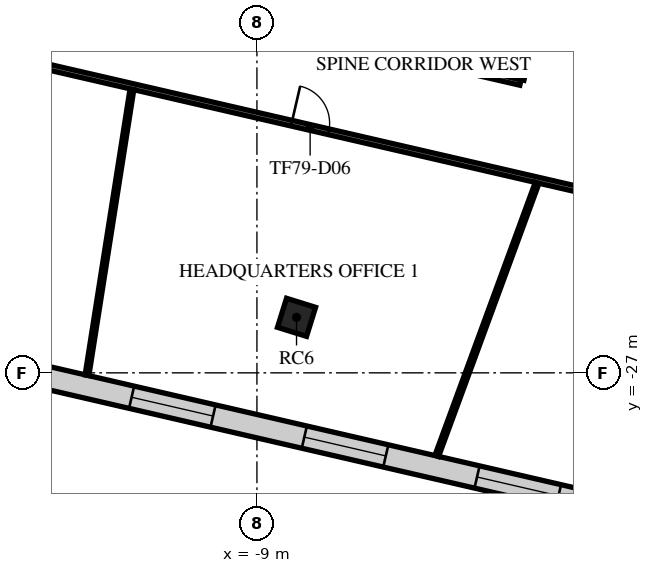
"""IFC4 building model, lengths in metres.
Left out: names, types, materials, properties, quantities, classifications, styles, units other than length and angle.
Written with IfcOpenShell. Run it as: python <this file> out.ifc"""

import sys

from ifc_helpers import new_model, si_unit, direction, frame, frame_2d, origin, origin_2d, place, context, subcontext, project, spatial, rectangle, extrude, element, fill, save


model = new_model("IFC4")
c1 = context("Model", 3, precision=1e-05, world=origin(), true_north=direction((0.0, 1.0)))
c2 = subcontext(c1, "Body", "Model", "MODEL_VIEW")
j1 = project(units=[si_unit("LENGTHUNIT", "METRE"), si_unit("PLANEANGLEUNIT", "RADIAN")], contexts=[c1])
p1 = place(None, origin())
s1 = spatial("IfcSite", under=j1, at=p1, CompositionType="ELEMENT")
p2 = place(p1, origin())
s2 = spatial("IfcBuilding", under=s1, at=p2, CompositionType="ELEMENT")
p3 = place(p2, frame((0.0, 0.0, 332.5)))
s3 = spatial("IfcBuildingStorey", under=s2, at=p3, CompositionType="ELEMENT", Elevation=332.5)
p4 = place(p3, frame((-7.958, -25.539, 0.0), z_axis=(0.0, 0.0, 1.0), x_axis=(0.297503182032, 0.954720826567, 0.0)))
e1 = element("IfcColumn", 1, at=p4, inside=s3, PredefinedType="COLUMN", context=c2, shape_type="SweptSolid", body=[
    extrude(rectangle(XDim=0.8, YDim=0.8, at=origin_2d()), origin(), (0.0, 0.0, 1.0), 4.0),
])
p5 = place(p3, frame((-27.133, -24.217, 0.0), z_axis=(0.0, 0.0, 1.0), x_axis=(0.974370901945, -0.224947428174, 0.0)))
e2 = element("IfcWall", 2, at=p5, inside=s3, PredefinedType="STANDARD", context=c2, shape_type="SweptSolid", body=[
    extrude(rectangle(XDim=41.979, YDim=0.6, at=frame_2d((20.99, 0.0))), origin(), (0.0, 0.0, 1.0), 3.65),
])
p6 = place(p5, frame((1.232, 0.0, 0.9)))
e3 = element("IfcOpeningElement", 3, at=p6, cuts=e2, PredefinedType="OPENING", context=c2, shape_type="SweptSolid", body=[
    extrude(rectangle(XDim=2.2, YDim=2.1, at=frame_2d((1.1, 1.05))), frame((0.0, 0.31, 0.0), z_axis=(0.0, -1.0, 0.0), x_axis=(1.0, 0.0, 0.0)), (0.0, 0.0, 1.0), 0.62),
])
p7 = place(p5, frame((5.896, 0.0, 0.9)))
e4 = element("IfcOpeningElement", 4, at=p7, cuts=e2, PredefinedType="OPENING", context=c2, shape_type="SweptSolid", body=[
    extrude(rectangle(XDim=2.2, YDim=2.1, at=frame_2d((1.1, 1.05))), frame((0.0, 0.31, 0.0), z_axis=(0.0, -1.0, 0.0), x_axis=(1.0, 0.0, 0.0)), (0.0, 0.0, 1.0), 0.62),
])
p8 = place(p5, frame((10.561, 0.0, 0.9)))
e5 = element("IfcOpeningElement", 5, at=p8, cuts=e2, PredefinedType="OPENING", context=c2, shape_type="SweptSolid", body=[
    extrude(rectangle(XDim=2.2, YDim=2.1, at=frame_2d((1.1, 1.05))), frame((0.0, 0.31, 0.0), z_axis=(0.0, -1.0, 0.0), x_axis=(1.0, 0.0, 0.0)), (0.0, 0.0, 1.0), 0.62),
])
p9 = place(p5, frame((15.225, 0.0, 0.9)))
e6 = element("IfcOpeningElement", 6, at=p9, cuts=e2, PredefinedType="OPENING", context=c2, shape_type="SweptSolid", body=[
    extrude(rectangle(XDim=2.2, YDim=2.1, at=frame_2d((1.1, 1.05))), frame((0.0, 0.31, 0.0), z_axis=(0.0, -1.0, 0.0), x_axis=(1.0, 0.0, 0.0)), (0.0, 0.0, 1.0), 0.62),
])
p10 = place(p5, frame((19.89, 0.0, 0.9)))
e7 = element("IfcOpeningElement", 7, at=p10, cuts=e2, PredefinedType="OPENING", context=c2, shape_type="SweptSolid", body=[
    extrude(rectangle(XDim=2.2, YDim=2.1, at=frame_2d((1.1, 1.05))), frame((0.0, 0.31, 0.0), z_axis=(0.0, -1.0, 0.0), x_axis=(1.0, 0.0, 0.0)), (0.0, 0.0, 1.0), 0.62),
])
p11 = place(p5, frame((24.554, 0.0, 0.9)))
e8 = element("IfcOpeningElement", 8, at=p11, cuts=e2, PredefinedType="OPENING", context=c2, shape_type="SweptSolid", body=[
    extrude(rectangle(XDim=2.2, YDim=2.1, at=frame_2d((1.1, 1.05))), frame((0.0, 0.31, 0.0), z_axis=(0.0, -1.0, 0.0), x_axis=(1.0, 0.0, 0.0)), (0.0, 0.0, 1.0), 0.62),
])
p12 = place(p5, frame((29.218, 0.0, 0.9)))
e9 = element("IfcOpeningElement", 9, at=p12, cuts=e2, PredefinedType="OPENING", context=c2, shape_type="SweptSolid", body=[
    extrude(rectangle(XDim=2.2, YDim=2.1, at=frame_2d((1.1, 1.05))), frame((0.0, 0.31, 0.0), z_axis=(0.0, -1.0, 0.0), x_axis=(1.0, 0.0, 0.0)), (0.0, 0.0, 1.0), 0.62),
])
p13 = place(p5, frame((33.883, 0.0, 0.9)))
e10 = element("IfcOpeningElement", 10, at=p13, cuts=e2, PredefinedType="OPENING", context=c2, shape_type="SweptSolid", body=[
    extrude(rectangle(XDim=2.2, YDim=2.1, at=frame_2d((1.1, 1.05))), frame((0.0, 0.31, 0.0), z_axis=(0.0, -1.0, 0.0), x_axis=(1.0, 0.0, 0.0)), (0.0, 0.0, 1.0), 0.62),
])
p14 = place(p5, frame((38.547, 0.0, 0.9)))
e11 = element("IfcOpeningElement", 11, at=p14, cuts=e2, PredefinedType="OPENING", context=c2, shape_type="SweptSolid", body=[
    extrude(rectangle(XDim=2.2, YDim=2.1, at=frame_2d((1.1, 1.05))), frame((0.0, 0.31, 0.0), z_axis=(0.0, -1.0, 0.0), x_axis=(1.0, 0.0, 0.0)), (0.0, 0.0, 1.0), 0.62),
])
p15 = place(p3, frame((-22.037, -17.21, 0.0), z_axis=(0.0, 0.0, 1.0), x_axis=(0.974365877869, -0.224969189101, 0.0)))
e12 = element("IfcWall", 12, at=p15, inside=s3, PredefinedType="PARTITIONING", context=c2, shape_type="SweptSolid", body=[
    extrude(rectangle(XDim=35.276, YDim=0.15, at=frame_2d((17.638, 0.0))), origin(), (0.0, 0.0, 1.0), 3.25),
])
p16 = place(p15, frame((14.317, 0.0, 0.0)))
e13 = element("IfcOpeningElement", 13, at=p16, cuts=e12, PredefinedType="OPENING", context=c2, shape_type="SweptSolid", body=[
    extrude(rectangle(XDim=1.0, YDim=2.1, at=frame_2d((0.5, 1.05))), frame((0.0, 0.085, 0.0), z_axis=(0.0, -1.0, 0.0), x_axis=(1.0, 0.0, 0.0)), (0.0, 0.0, 1.0), 0.17),
])
p17 = place(p3, frame((-21.497, -14.872, 0.0), z_axis=(0.0, 0.0, 1.0), x_axis=(0.974371384758, -0.224945336838, 0.0)))
e14 = element("IfcWall", 14, at=p17, inside=s3, PredefinedType="PARTITIONING", context=c2, shape_type="SweptSolid", body=[
    extrude(rectangle(XDim=19.943, YDim=0.15, at=frame_2d((9.972, 0.0))), origin(), (0.0, 0.0, 1.0), 3.25),
])
p18 = place(p17, frame((3.8, 0.0, 0.0)))
e15 = element("IfcOpeningElement", 15, at=p18, cuts=e14, PredefinedType="OPENING", context=c2, shape_type="SweptSolid", body=[
    extrude(rectangle(XDim=1.0, YDim=2.1, at=frame_2d((0.5, 1.05))), frame((0.0, 0.085, 0.0), z_axis=(0.0, -1.0, 0.0), x_axis=(1.0, 0.0, 0.0)), (0.0, 0.0, 1.0), 0.17),
])
p19 = place(p3, frame((-2.048, -19.285, 0.0), z_axis=(0.0, 0.0, 1.0), x_axis=(0.225024396784, 0.974353129441, 0.0)))
e16 = element("IfcWall", 16, at=p19, inside=s3, PredefinedType="PARTITIONING", context=c2, shape_type="SweptSolid", body=[
    extrude(rectangle(XDim=3.893, YDim=0.15, at=frame_2d((1.946, 0.0))), origin(), (0.0, 0.0, 1.0), 3.25),
])
p20 = place(p3, frame((-13.471, -27.061, 0.0), z_axis=(0.0, 0.0, 1.0), x_axis=(0.155249458532, 0.987875298621, 0.0)))
e17 = element("IfcWall", 17, at=p20, inside=s3, PredefinedType="PARTITIONING", context=c2, shape_type="SweptSolid", body=[
    extrude(rectangle(XDim=7.613, YDim=0.1, at=frame_2d((3.806, 0.0))), origin(), (0.0, 0.0, 1.0), 3.05),
])
p21 = place(p3, frame((-4.268, -29.186, 0.0), z_axis=(0.0, 0.0, 1.0), x_axis=(0.345023473148, 0.938594056543, 0.0)))
e18 = element("IfcWall", 18, at=p21, inside=s3, PredefinedType="PARTITIONING", context=c2, shape_type="SweptSolid", body=[
    extrude(rectangle(XDim=7.65, YDim=0.1, at=frame_2d((3.825, 0.0))), origin(), (0.0, 0.0, 1.0), 3.05),
])
p22 = place(p3, frame((-2.303, -19.226, 0.0), z_axis=(0.0, 0.0, 1.0), x_axis=(0.224864152428, 0.974390123592, 0.0)))
e19 = element("IfcWall", 19, at=p22, inside=s3, PredefinedType="PARTITIONING", context=c2, shape_type="SweptSolid", body=[
    extrude(rectangle(XDim=3.838, YDim=0.1, at=frame_2d((1.919, 0.0))), origin(), (0.0, 0.0, 1.0), 3.25),
])
p23 = place(p9, origin())
e20 = element("IfcWindow", 20, at=p23, inside=s3, PartitioningType="SINGLE_PANEL", PredefinedType="WINDOW", context=c2, shape_type="SweptSolid", body=[
    extrude(rectangle(XDim=2.2, YDim=2.1, at=frame_2d((1.1, 1.05))), frame((0.0, 0.03, 0.0), z_axis=(0.0, -1.0, 0.0), x_axis=(1.0, 0.0, 0.0)), (0.0, 0.0, 1.0), 0.06),
])
fill(e6, e20)
p24 = place(p10, origin())
e21 = element("IfcWindow", 21, at=p24, inside=s3, PartitioningType="SINGLE_PANEL", PredefinedType="WINDOW", context=c2, shape_type="SweptSolid", body=[
    extrude(rectangle(XDim=2.2, YDim=2.1, at=frame_2d((1.1, 1.05))), frame((0.0, 0.03, 0.0), z_axis=(0.0, -1.0, 0.0), x_axis=(1.0, 0.0, 0.0)), (0.0, 0.0, 1.0), 0.06),
])
fill(e7, e21)
p25 = place(p11, origin())
e22 = element("IfcWindow", 22, at=p25, inside=s3, PartitioningType="SINGLE_PANEL", PredefinedType="WINDOW", context=c2, shape_type="SweptSolid", body=[
    extrude(rectangle(XDim=2.2, YDim=2.1, at=frame_2d((1.1, 1.05))), frame((0.0, 0.03, 0.0), z_axis=(0.0, -1.0, 0.0), x_axis=(1.0, 0.0, 0.0)), (0.0, 0.0, 1.0), 0.06),
])
fill(e8, e22)
p26 = place(p16, frame((1.0, 0.0, 0.0), z_axis=(0.0, 0.0, 1.0), x_axis=(-1.0, 0.0, 0.0)))
e23 = element("IfcDoor", 23, at=p26, inside=s3, OperationType="SINGLE_SWING_LEFT", PredefinedType="DOOR", context=c2, shape_type="SweptSolid", body=[
    extrude(rectangle(XDim=1.0, YDim=2.1, at=frame_2d((0.5, 1.05))), frame((0.0, 0.025, 0.0), z_axis=(0.0, -1.0, 0.0), x_axis=(1.0, 0.0, 0.0)), (0.0, 0.0, 1.0), 0.05),
])
fill(e13, e23)
save(model, sys.argv[1])
